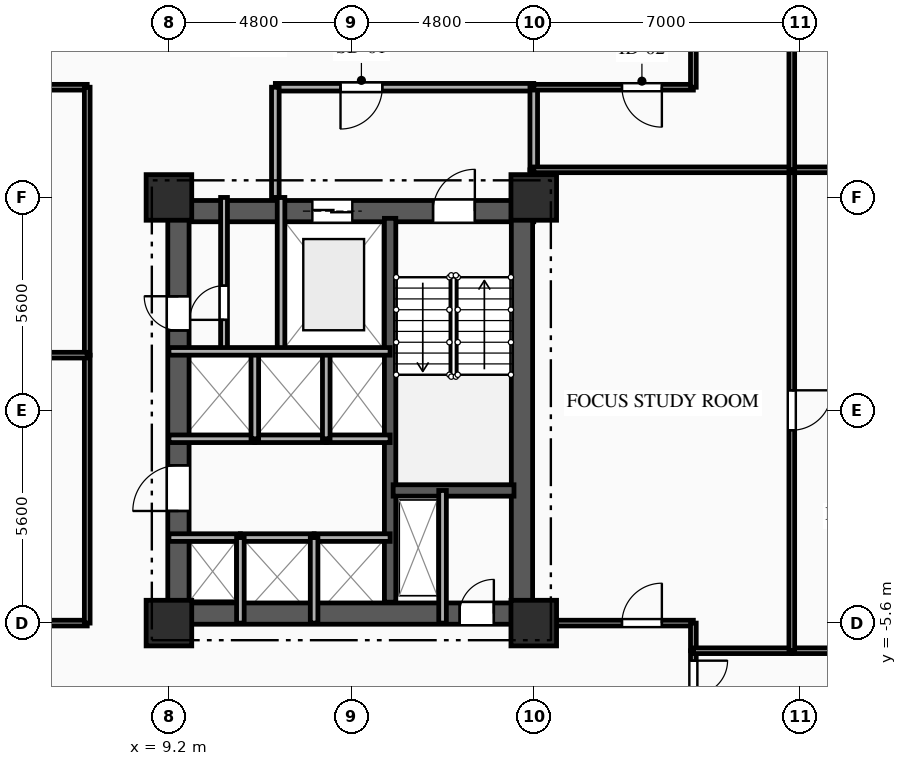
"""IFC4 building model, lengths in metres.
Left out: names, types, materials, properties, quantities, classifications, styles, units other than length and angle.
Written with IfcOpenShell. Run it as: python <this file> out.ifc"""

import sys

from ifc_helpers import new_model, si_unit, direction, frame, frame_2d, origin, origin_2d, place, context, subcontext, project, spatial, rectangle, extrude, element, fill, save


model = new_model("IFC4")
c1 = context("Model", 3, precision=1e-05, world=origin(), true_north=direction((0.0, 1.0)))
c2 = subcontext(c1, "Body", "Model", "MODEL_VIEW")
j1 = project(units=[si_unit("LENGTHUNIT", "METRE"), si_unit("PLANEANGLEUNIT", "RADIAN")], contexts=[c1])
p1 = place(None, origin())
s1 = spatial("IfcSite", under=j1, at=p1, CompositionType="ELEMENT")
p2 = place(p1, origin())
s2 = spatial("IfcBuilding", under=s1, at=p2, CompositionType="ELEMENT")
p3 = place(p2, frame((0.0, 0.0, 37.05)))
s3 = spatial("IfcBuildingStorey", under=s2, at=p3, CompositionType="ELEMENT", Elevation=37.05)
for number, where, z_axis, x_axis in (
    (1, (9.2, -5.6, 0.0), (0.0, 0.0, 1.0), (1.0, 0.0, 0.0)),
    (2, (9.2, 5.6, 0.0), (0.0, 0.0, 1.0), (1.0, 0.0, 0.0)),
    (3, (18.8, -5.6, 0.0), (0.0, 0.0, 1.0), (1.0, 0.0, 0.0)),
    (4, (18.8, 5.6, 0.0), (0.0, 0.0, 1.0), (1.0, 0.0, 0.0)),
):
    element("IfcColumn", number, at=place(p3, frame(where, z_axis=z_axis, x_axis=x_axis)), inside=s3, PredefinedType="COLUMN", context=c2, shape_type="SweptSolid", body=[
        extrude(rectangle(XDim=1.2, YDim=1.2, at=origin_2d()), origin(), (0.0, 0.0, 1.0), 3.35),
    ])
p4 = place(p3, frame((9.2, 5.24, 0.0), z_axis=(0.0, 0.0, 1.0), x_axis=(1.0, 0.0, 0.0)))
e5 = element("IfcWall", 5, at=p4, inside=s3, PredefinedType="SHEAR", context=c2, shape_type="SweptSolid", body=[
    extrude(rectangle(XDim=9.6, YDim=0.56, at=frame_2d((4.8, 0.0))), origin(), (0.0, 0.0, 1.0), 3.035),
])
p5 = place(p4, frame((6.95, 0.0, 0.0)))
e6 = element("IfcOpeningElement", 6, at=p5, cuts=e5, PredefinedType="OPENING", context=c2, shape_type="SweptSolid", body=[
    extrude(rectangle(XDim=1.1, YDim=2.15, at=frame_2d((0.55, 1.075))), frame((0.0, 0.29, 0.0), z_axis=(0.0, -1.0, 0.0), x_axis=(1.0, 0.0, 0.0)), (0.0, 0.0, 1.0), 0.58),
])
p6 = place(p4, frame((3.775, 0.0, 0.0)))
e7 = element("IfcOpeningElement", 7, at=p6, cuts=e5, PredefinedType="OPENING", context=c2, shape_type="SweptSolid", body=[
    extrude(rectangle(XDim=1.05, YDim=2.1, at=frame_2d((0.525, 1.05))), frame((0.0, 0.29, 0.0), z_axis=(0.0, -1.0, 0.0), x_axis=(1.0, 0.0, 0.0)), (0.0, 0.0, 1.0), 0.58),
])
p7 = place(p3, frame((9.2, -5.35, 0.0), z_axis=(0.0, 0.0, 1.0), x_axis=(1.0, 0.0, 0.0)))
e8 = element("IfcWall", 8, at=p7, inside=s3, PredefinedType="SHEAR", context=c2, shape_type="SweptSolid", body=[
    extrude(rectangle(XDim=9.6, YDim=0.56, at=frame_2d((4.8, 0.0))), origin(), (0.0, 0.0, 1.0), 3.035),
])
p8 = place(p7, frame((7.65, 0.0, 0.0)))
e9 = element("IfcOpeningElement", 9, at=p8, cuts=e8, PredefinedType="OPENING", context=c2, shape_type="SweptSolid", body=[
    extrude(rectangle(XDim=0.9, YDim=2.1, at=frame_2d((0.45, 1.05))), frame((0.0, 0.29, 0.0), z_axis=(0.0, -1.0, 0.0), x_axis=(1.0, 0.0, 0.0)), (0.0, 0.0, 1.0), 0.58),
])
p9 = place(p3, frame((9.45, -5.05, 0.0), z_axis=(0.0, 0.0, 1.0), x_axis=(0.0, 1.0, 0.0)))
e10 = element("IfcWall", 10, at=p9, inside=s3, PredefinedType="SHEAR", context=c2, shape_type="SweptSolid", body=[
    extrude(rectangle(XDim=10.1, YDim=0.56, at=frame_2d((5.05, 0.0))), origin(), (0.0, 0.0, 1.0), 3.035),
])
p10 = place(p9, frame((7.15, 0.0, 0.0)))
e11 = element("IfcOpeningElement", 11, at=p10, cuts=e10, PredefinedType="OPENING", context=c2, shape_type="SweptSolid", body=[
    extrude(rectangle(XDim=0.9, YDim=2.1, at=frame_2d((0.45, 1.05))), frame((0.0, 0.29, 0.0), z_axis=(0.0, -1.0, 0.0), x_axis=(1.0, 0.0, 0.0)), (0.0, 0.0, 1.0), 0.58),
])
p11 = place(p9, frame((2.4, 0.0, 0.0)))
e12 = element("IfcOpeningElement", 12, at=p11, cuts=e10, PredefinedType="OPENING", context=c2, shape_type="SweptSolid", body=[
    extrude(rectangle(XDim=1.2, YDim=2.15, at=frame_2d((0.6, 1.075))), frame((0.0, 0.29, 0.0), z_axis=(0.0, -1.0, 0.0), x_axis=(1.0, 0.0, 0.0)), (0.0, 0.0, 1.0), 0.58),
])
p12 = place(p3, frame((18.49, -5.05, 0.0), z_axis=(0.0, 0.0, 1.0), x_axis=(0.0, 1.0, 0.0)))
e13 = element("IfcWall", 13, at=p12, inside=s3, PredefinedType="SHEAR", context=c2, shape_type="SweptSolid", body=[
    extrude(rectangle(XDim=10.1, YDim=0.56, at=frame_2d((5.05, 0.0))), origin(), (0.0, 0.0, 1.0), 3.035),
])
p13 = place(p3, frame((15.02, -5.05, 0.0), z_axis=(0.0, 0.0, 1.0), x_axis=(0.0, 1.0, 0.0)))
e14 = element("IfcWall", 14, at=p13, inside=s3, PredefinedType="SHEAR", context=c2, shape_type="SweptSolid", body=[
    extrude(rectangle(XDim=10.1, YDim=0.3, at=frame_2d((5.05, 0.0))), origin(), (0.0, 0.0, 1.0), 3.035),
])
p14 = place(p3, frame((15.1, -2.11, 0.0), z_axis=(0.0, 0.0, 1.0), x_axis=(1.0, 0.0, 0.0)))
e15 = element("IfcWall", 15, at=p14, inside=s3, PredefinedType="SHEAR", context=c2, shape_type="SweptSolid", body=[
    extrude(rectangle(XDim=3.18, YDim=0.3, at=frame_2d((1.59, 0.0))), origin(), (0.0, 0.0, 1.0), 3.035),
])
p15 = place(p3, frame((16.4, -2.11, 0.0), z_axis=(0.0, 0.0, 1.0), x_axis=(0.0, -1.0, 0.0)))
e16 = element("IfcWall", 16, at=p15, inside=s3, PredefinedType="PARTITIONING", context=c2, shape_type="SweptSolid", body=[
    extrude(rectangle(XDim=3.49, YDim=0.2, at=frame_2d((1.745, 0.0))), origin(), (0.0, 0.0, 1.0), 3.035),
])
p16 = place(p3, frame((12.15, 5.6, 0.0), z_axis=(0.0, 0.0, 1.0), x_axis=(0.0, -1.0, 0.0)))
e17 = element("IfcWall", 17, at=p16, inside=s3, PredefinedType="PARTITIONING", context=c2, shape_type="SweptSolid", body=[
    extrude(rectangle(XDim=4.05, YDim=0.2, at=frame_2d((2.025, 0.0))), origin(), (0.0, 0.0, 1.0), 3.035),
])
p17 = place(p3, frame((18.8, 8.5, 0.0), z_axis=(0.0, 0.0, 1.0), x_axis=(-1.0, 0.0, 0.0)))
e18 = element("IfcWall", 18, at=p17, inside=s3, PredefinedType="PARTITIONING", context=c2, shape_type="SweptSolid", body=[
    extrude(rectangle(XDim=6.8, YDim=0.2, at=frame_2d((3.4, 0.0))), origin(), (0.0, 0.0, 1.0), 3.035),
])
p18 = place(p17, frame((3.985, 0.0, 0.0)))
e19 = element("IfcOpeningElement", 19, at=p18, cuts=e18, PredefinedType="OPENING", context=c2, shape_type="SweptSolid", body=[
    extrude(rectangle(XDim=1.1, YDim=2.15, at=frame_2d((0.55, 1.075))), frame((0.0, 0.11, 0.0), z_axis=(0.0, -1.0, 0.0), x_axis=(1.0, 0.0, 0.0)), (0.0, 0.0, 1.0), 0.22),
])
p19 = place(p3, frame((12.0, 8.5, 0.0), z_axis=(0.0, 0.0, 1.0), x_axis=(0.0, -1.0, 0.0)))
e20 = element("IfcWall", 20, at=p19, inside=s3, PredefinedType="PARTITIONING", context=c2, shape_type="SweptSolid", body=[
    extrude(rectangle(XDim=2.9, YDim=0.2, at=frame_2d((1.45, 0.0))), origin(), (0.0, 0.0, 1.0), 3.035),
])
p20 = place(p3, frame((18.8, 5.6, 0.0), z_axis=(0.0, 0.0, 1.0), x_axis=(0.0, 1.0, 0.0)))
e21 = element("IfcWall", 21, at=p20, inside=s3, PredefinedType="PARTITIONING", context=c2, shape_type="SweptSolid", body=[
    extrude(rectangle(XDim=0.727, YDim=0.2, at=frame_2d((0.363, 0.0))), origin(), (0.0, 0.0, 1.0), 2.52),
])
p21 = place(p3, frame((18.8, 6.327, 0.0), z_axis=(0.0, 0.0, 1.0), x_axis=(0.0, 1.0, 0.0)))
e22 = element("IfcWall", 22, at=p21, inside=s3, PredefinedType="PARTITIONING", context=c2, shape_type="SweptSolid", body=[
    extrude(rectangle(XDim=2.173, YDim=0.2, at=frame_2d((1.086, 0.0))), origin(), (0.0, 0.0, 1.0), 2.52),
])
p22 = place(p3, frame((10.65, 1.55, 0.0), z_axis=(0.0, 0.0, 1.0), x_axis=(0.0, 1.0, 0.0)))
e23 = element("IfcWall", 23, at=p22, inside=s3, PredefinedType="PARTITIONING", context=c2, shape_type="SweptSolid", body=[
    extrude(rectangle(XDim=4.05, YDim=0.18, at=frame_2d((2.025, 0.0))), origin(), (0.0, 0.0, 1.0), 3.035),
])
p23 = place(p22, frame((0.829, 0.0, 0.0)))
e24 = element("IfcOpeningElement", 24, at=p23, cuts=e23, PredefinedType="OPENING", context=c2, shape_type="SweptSolid", body=[
    extrude(rectangle(XDim=0.9, YDim=2.1, at=frame_2d((0.45, 1.05))), frame((0.0, 0.1, 0.0), z_axis=(0.0, -1.0, 0.0), x_axis=(1.0, 0.0, 0.0)), (0.0, 0.0, 1.0), 0.2),
])
p24 = place(p3, frame((9.2, -3.35, 0.0), z_axis=(0.0, 0.0, 1.0), x_axis=(1.0, 0.0, 0.0)))
e25 = element("IfcWall", 25, at=p24, inside=s3, PredefinedType="PARTITIONING", context=c2, shape_type="SweptSolid", body=[
    extrude(rectangle(XDim=1.88, YDim=0.2, at=frame_2d((0.94, 0.0))), origin(), (0.0, 0.0, 1.0), 2.75),
])
p25 = place(p3, frame((11.08, -3.35, 0.0), z_axis=(0.0, 0.0, 1.0), x_axis=(1.0, 0.0, 0.0)))
e26 = element("IfcWall", 26, at=p25, inside=s3, PredefinedType="PARTITIONING", context=c2, shape_type="SweptSolid", body=[
    extrude(rectangle(XDim=1.94, YDim=0.2, at=frame_2d((0.97, 0.0))), origin(), (0.0, 0.0, 1.0), 3.035),
])
p26 = place(p3, frame((13.02, -3.35, 0.0), z_axis=(0.0, 0.0, 1.0), x_axis=(1.0, 0.0, 0.0)))
e27 = element("IfcWall", 27, at=p26, inside=s3, PredefinedType="PARTITIONING", context=c2, shape_type="SweptSolid", body=[
    extrude(rectangle(XDim=2.0, YDim=0.2, at=frame_2d((1.0, 0.0))), origin(), (0.0, 0.0, 1.0), 3.035),
])
p27 = place(p3, frame((11.46, -0.75, 0.0), z_axis=(0.0, 0.0, 1.0), x_axis=(-1.0, 0.0, 0.0)))
e28 = element("IfcWall", 28, at=p27, inside=s3, PredefinedType="PARTITIONING", context=c2, shape_type="SweptSolid", body=[
    extrude(rectangle(XDim=2.26, YDim=0.2, at=frame_2d((1.13, 0.0))), origin(), (0.0, 0.0, 1.0), 3.035),
])
p28 = place(p3, frame((13.34, -0.75, 0.0), z_axis=(0.0, 0.0, 1.0), x_axis=(-1.0, 0.0, 0.0)))
e29 = element("IfcWall", 29, at=p28, inside=s3, PredefinedType="PARTITIONING", context=c2, shape_type="SweptSolid", body=[
    extrude(rectangle(XDim=1.88, YDim=0.2, at=frame_2d((0.94, 0.0))), origin(), (0.0, 0.0, 1.0), 3.035),
])
p29 = place(p3, frame((15.02, -0.75, 0.0), z_axis=(0.0, 0.0, 1.0), x_axis=(-1.0, 0.0, 0.0)))
e30 = element("IfcWall", 30, at=p29, inside=s3, PredefinedType="PARTITIONING", context=c2, shape_type="SweptSolid", body=[
    extrude(rectangle(XDim=1.68, YDim=0.2, at=frame_2d((0.84, 0.0))), origin(), (0.0, 0.0, 1.0), 3.035),
])
for number, where, z_axis, x_axis in (
    (31, (11.08, -5.6, 0.0), (0.0, 0.0, 1.0), (0.0, 1.0, 0.0)),
    (32, (13.02, -5.6, 0.0), (0.0, 0.0, 1.0), (0.0, 1.0, 0.0)),
):
    element("IfcWall", number, at=place(p3, frame(where, z_axis=z_axis, x_axis=x_axis)), inside=s3, PredefinedType="PARTITIONING", context=c2, shape_type="SweptSolid", body=[
        extrude(rectangle(XDim=2.25, YDim=0.2, at=frame_2d((1.125, 0.0))), origin(), (0.0, 0.0, 1.0), 3.035),
    ])
for number, where, z_axis, x_axis in (
    (33, (11.46, -0.75, 0.0), (0.0, 0.0, 1.0), (0.0, 1.0, 0.0)),
    (34, (13.34, -0.75, 0.0), (0.0, 0.0, 1.0), (0.0, 1.0, 0.0)),
):
    element("IfcWall", number, at=place(p3, frame(where, z_axis=z_axis, x_axis=x_axis)), inside=s3, PredefinedType="PARTITIONING", context=c2, shape_type="SweptSolid", body=[
        extrude(rectangle(XDim=2.3, YDim=0.2, at=frame_2d((1.15, 0.0))), origin(), (0.0, 0.0, 1.0), 3.035),
    ])
p30 = place(p3, frame((23.0, 8.5, 0.0), z_axis=(0.0, 0.0, 1.0), x_axis=(-1.0, 0.0, 0.0)))
e35 = element("IfcWall", 35, at=p30, inside=s3, PredefinedType="PARTITIONING", context=c2, shape_type="SweptSolid", body=[
    extrude(rectangle(XDim=4.2, YDim=0.15, at=frame_2d((2.1, 0.0))), origin(), (0.0, 0.0, 1.0), 3.035),
])
p31 = place(p30, frame((0.829, 0.0, 0.0)))
e36 = element("IfcOpeningElement", 36, at=p31, cuts=e35, PredefinedType="OPENING", context=c2, shape_type="SweptSolid", body=[
    extrude(rectangle(XDim=1.05, YDim=2.15, at=frame_2d((0.525, 1.075))), frame((0.0, 0.085, 0.0), z_axis=(0.0, -1.0, 0.0), x_axis=(1.0, 0.0, 0.0)), (0.0, 0.0, 1.0), 0.17),
])
p32 = place(p3, frame((23.0, 10.65, 0.0), z_axis=(0.0, 0.0, 1.0), x_axis=(0.0, -1.0, 0.0)))
e37 = element("IfcWall", 37, at=p32, inside=s3, PredefinedType="PARTITIONING", context=c2, shape_type="SweptSolid", body=[
    extrude(rectangle(XDim=2.15, YDim=0.15, at=frame_2d((1.075, 0.0))), origin(), (0.0, 0.0, 1.0), 3.035),
])
p33 = place(p3, frame((7.05, 8.5, 0.0), z_axis=(0.0, 0.0, 1.0), x_axis=(-1.0, 0.0, 0.0)))
e38 = element("IfcWall", 38, at=p33, inside=s3, PredefinedType="PARTITIONING", context=c2, shape_type="SweptSolid", body=[
    extrude(rectangle(XDim=7.05, YDim=0.15, at=frame_2d((3.525, 0.0))), origin(), (0.0, 0.0, 1.0), 3.035),
])
p34 = place(p3, frame((23.0, -6.327, 0.0), z_axis=(0.0, 0.0, 1.0), x_axis=(0.0, -1.0, 0.0)))
e39 = element("IfcWall", 39, at=p34, inside=s3, PredefinedType="PARTITIONING", context=c2, shape_type="SweptSolid", body=[
    extrude(rectangle(XDim=1.423, YDim=0.15, at=frame_2d((0.711, 0.0))), origin(), (0.0, 0.0, 1.0), 3.035),
])
p35 = place(p34, frame((0.261, 0.0, 0.0)))
e40 = element("IfcOpeningElement", 40, at=p35, cuts=e39, PredefinedType="OPENING", context=c2, shape_type="SweptSolid", body=[
    extrude(rectangle(XDim=0.9, YDim=2.1, at=frame_2d((0.45, 1.05))), frame((0.0, 0.085, 0.0), z_axis=(0.0, -1.0, 0.0), x_axis=(1.0, 0.0, 0.0)), (0.0, 0.0, 1.0), 0.17),
])
p36 = place(p3, frame((18.8, -5.6, 0.0), z_axis=(0.0, 0.0, 1.0), x_axis=(1.0, 0.0, 0.0)))
e41 = element("IfcWall", 41, at=p36, inside=s3, PredefinedType="PARTITIONING", context=c2, shape_type="SweptSolid", body=[
    extrude(rectangle(XDim=4.2, YDim=0.15, at=frame_2d((2.1, 0.0))), origin(), (0.0, 0.0, 1.0), 3.035),
])
p37 = place(p36, frame((2.321, 0.0, 0.0)))
e42 = element("IfcOpeningElement", 42, at=p37, cuts=e41, PredefinedType="OPENING", context=c2, shape_type="SweptSolid", body=[
    extrude(rectangle(XDim=1.05, YDim=2.15, at=frame_2d((0.525, 1.075))), frame((0.0, 0.085, 0.0), z_axis=(0.0, -1.0, 0.0), x_axis=(1.0, 0.0, 0.0)), (0.0, 0.0, 1.0), 0.17),
])
p38 = place(p3, frame((23.0, -5.6, 0.0), z_axis=(0.0, 0.0, 1.0), x_axis=(0.0, -1.0, 0.0)))
e43 = element("IfcWall", 43, at=p38, inside=s3, PredefinedType="PARTITIONING", context=c2, shape_type="SweptSolid", body=[
    extrude(rectangle(XDim=0.727, YDim=0.15, at=frame_2d((0.363, 0.0))), origin(), (0.0, 0.0, 1.0), 3.035),
])
p39 = place(p3, frame((0.0, -5.6, 0.0), z_axis=(0.0, 0.0, 1.0), x_axis=(1.0, 0.0, 0.0)))
e44 = element("IfcWall", 44, at=p39, inside=s3, PredefinedType="PARTITIONING", context=c2, shape_type="SweptSolid", body=[
    extrude(rectangle(XDim=7.05, YDim=0.15, at=frame_2d((3.525, 0.0))), origin(), (0.0, 0.0, 1.0), 2.52),
])
for number, where, z_axis, x_axis in (
    (45, (7.05, -5.6, 0.0), (0.0, 0.0, 1.0), (0.0, 1.0, 0.0)),
    (46, (7.05, 1.45, 0.0), (0.0, 0.0, 1.0), (0.0, 1.0, 0.0)),
):
    element("IfcWall", number, at=place(p3, frame(where, z_axis=z_axis, x_axis=x_axis)), inside=s3, PredefinedType="PARTITIONING", context=c2, shape_type="SweptSolid", body=[
        extrude(rectangle(XDim=7.05, YDim=0.15, at=frame_2d((3.525, 0.0))), origin(), (0.0, 0.0, 1.0), 3.035),
    ])
p40 = place(p3, frame((23.0, -6.327, 0.0), z_axis=(0.0, 0.0, 1.0), x_axis=(1.0, 0.0, 0.0)))
e47 = element("IfcWall", 47, at=p40, inside=s3, PredefinedType="PARTITIONING", context=c2, shape_type="SweptSolid", body=[
    extrude(rectangle(XDim=2.59, YDim=0.15, at=frame_2d((1.295, 0.0))), origin(), (0.0, 0.0, 1.0), 3.035),
])
p41 = place(p3, frame((25.59, -6.327, 0.0), z_axis=(0.0, 0.0, 1.0), x_axis=(1.0, 0.0, 0.0)))
e48 = element("IfcWall", 48, at=p41, inside=s3, PredefinedType="PARTITIONING", context=c2, shape_type="SweptSolid", body=[
    extrude(rectangle(XDim=2.1, YDim=0.15, at=frame_2d((1.05, 0.0))), origin(), (0.0, 0.0, 1.0), 3.035),
])
p42 = place(p3, frame((25.59, 6.327, 0.0), z_axis=(0.0, 0.0, 1.0), x_axis=(0.0, -1.0, 0.0)))
e49 = element("IfcWall", 49, at=p42, inside=s3, PredefinedType="PARTITIONING", context=c2, shape_type="SweptSolid", body=[
    extrude(rectangle(XDim=12.654, YDim=0.15, at=frame_2d((6.327, 0.0))), origin(), (0.0, 0.0, 1.0), 2.69),
])
p43 = place(p42, frame((5.802, 0.0, 0.0)))
e50 = element("IfcOpeningElement", 50, at=p43, cuts=e49, PredefinedType="OPENING", context=c2, shape_type="SweptSolid", body=[
    extrude(rectangle(XDim=1.05, YDim=2.15, at=frame_2d((0.525, 1.075))), frame((0.0, 0.085, 0.0), z_axis=(0.0, -1.0, 0.0), x_axis=(1.0, 0.0, 0.0)), (0.0, 0.0, 1.0), 0.17),
])
p44 = place(p3, frame((18.8, 6.327, 0.0), z_axis=(0.0, 0.0, 1.0), x_axis=(1.0, 0.0, 0.0)))
e51 = element("IfcWall", 51, at=p44, inside=s3, PredefinedType="PARTITIONING", context=c2, shape_type="SweptSolid", body=[
    extrude(rectangle(XDim=6.79, YDim=0.15, at=frame_2d((3.395, 0.0))), origin(), (0.0, 0.0, 1.0), 3.035),
])
p45 = place(p3, frame((25.59, 6.327, 0.0), z_axis=(0.0, 0.0, 1.0), x_axis=(1.0, 0.0, 0.0)))
e52 = element("IfcWall", 52, at=p45, inside=s3, PredefinedType="PARTITIONING", context=c2, shape_type="SweptSolid", body=[
    extrude(rectangle(XDim=7.21, YDim=0.15, at=frame_2d((3.605, 0.0))), origin(), (0.0, 0.0, 1.0), 3.035),
])
p46 = place(p3, frame((25.59, 19.4, 0.0), z_axis=(0.0, 0.0, 1.0), x_axis=(0.0, -1.0, 0.0)))
e53 = element("IfcWall", 53, at=p46, inside=s3, PredefinedType="PARTITIONING", context=c2, shape_type="SweptSolid", body=[
    extrude(rectangle(XDim=13.073, YDim=0.15, at=frame_2d((6.537, 0.0))), origin(), (0.0, 0.0, 1.0), 2.69),
])
p47 = place(p46, frame((8.727, 0.0, 0.0)))
e54 = element("IfcOpeningElement", 54, at=p47, cuts=e53, PredefinedType="OPENING", context=c2, shape_type="SweptSolid", body=[
    extrude(rectangle(XDim=1.05, YDim=2.15, at=frame_2d((0.525, 1.075))), frame((0.0, 0.085, 0.0), z_axis=(0.0, -1.0, 0.0), x_axis=(1.0, 0.0, 0.0)), (0.0, 0.0, 1.0), 0.17),
])
p48 = place(p3, frame((-7.05, 1.45, 0.0), z_axis=(0.0, 0.0, 1.0), x_axis=(1.0, 0.0, 0.0)))
e55 = element("IfcWall", 55, at=p48, inside=s3, PredefinedType="PARTITIONING", context=c2, shape_type="SweptSolid", body=[
    extrude(rectangle(XDim=14.1, YDim=0.15, at=frame_2d((7.05, 0.0))), origin(), (0.0, 0.0, 1.0), 3.035),
])
p49 = place(p3, frame((9.2, 1.55, 0.0), z_axis=(0.0, 0.0, 1.0), x_axis=(1.0, 0.0, 0.0)))
e56 = element("IfcWall", 56, at=p49, inside=s3, PredefinedType="PARTITIONING", context=c2, shape_type="SweptSolid", body=[
    extrude(rectangle(XDim=5.82, YDim=0.2, at=frame_2d((2.91, 0.0))), origin(), (0.0, 0.0, 1.0), 3.035),
])
p50 = place(p5, origin())
e57 = element("IfcDoor", 57, at=p50, inside=s3, OperationType="SINGLE_SWING_RIGHT", PredefinedType="DOOR", context=c2, shape_type="SweptSolid", body=[
    extrude(rectangle(XDim=1.1, YDim=2.15, at=frame_2d((0.55, 1.075))), frame((0.0, 0.025, 0.0), z_axis=(0.0, -1.0, 0.0), x_axis=(1.0, 0.0, 0.0)), (0.0, 0.0, 1.0), 0.05),
])
fill(e6, e57)
p51 = place(p6, origin())
e58 = element("IfcDoor", 58, at=p51, inside=s3, OperationType="DOUBLE_DOOR_SLIDING", PredefinedType="DOOR", context=c2, shape_type="SweptSolid", body=[
    extrude(rectangle(XDim=1.05, YDim=2.1, at=frame_2d((0.525, 1.05))), frame((0.0, 0.025, 0.0), z_axis=(0.0, -1.0, 0.0), x_axis=(1.0, 0.0, 0.0)), (0.0, 0.0, 1.0), 0.05),
])
fill(e7, e58)
p52 = place(p8, origin())
e59 = element("IfcDoor", 59, at=p52, inside=s3, OperationType="SINGLE_SWING_RIGHT", PredefinedType="DOOR", context=c2, shape_type="SweptSolid", body=[
    extrude(rectangle(XDim=0.9, YDim=2.1, at=frame_2d((0.45, 1.05))), frame((0.0, 0.025, 0.0), z_axis=(0.0, -1.0, 0.0), x_axis=(1.0, 0.0, 0.0)), (0.0, 0.0, 1.0), 0.05),
])
fill(e9, e59)
p53 = place(p18, origin())
e60 = element("IfcDoor", 60, at=p53, inside=s3, OperationType="SINGLE_SWING_RIGHT", PredefinedType="DOOR", context=c2, shape_type="SweptSolid", body=[
    extrude(rectangle(XDim=1.1, YDim=2.15, at=frame_2d((0.55, 1.075))), frame((0.0, 0.025, 0.0), z_axis=(0.0, -1.0, 0.0), x_axis=(1.0, 0.0, 0.0)), (0.0, 0.0, 1.0), 0.05),
])
fill(e19, e60)
p54 = place(p23, origin())
e61 = element("IfcDoor", 61, at=p54, inside=s3, OperationType="SINGLE_SWING_LEFT", PredefinedType="DOOR", context=c2, shape_type="SweptSolid", body=[
    extrude(rectangle(XDim=0.9, YDim=2.1, at=frame_2d((0.45, 1.05))), frame((0.0, 0.025, 0.0), z_axis=(0.0, -1.0, 0.0), x_axis=(1.0, 0.0, 0.0)), (0.0, 0.0, 1.0), 0.05),
])
fill(e24, e61)
p55 = place(p10, origin())
e62 = element("IfcDoor", 62, at=p55, inside=s3, OperationType="SINGLE_SWING_RIGHT", PredefinedType="DOOR", context=c2, shape_type="SweptSolid", body=[
    extrude(rectangle(XDim=0.9, YDim=2.1, at=frame_2d((0.45, 1.05))), frame((0.0, 0.025, 0.0), z_axis=(0.0, -1.0, 0.0), x_axis=(1.0, 0.0, 0.0)), (0.0, 0.0, 1.0), 0.05),
])
fill(e11, e62)
p56 = place(p11, origin())
e63 = element("IfcDoor", 63, at=p56, inside=s3, OperationType="SINGLE_SWING_LEFT", PredefinedType="DOOR", context=c2, shape_type="SweptSolid", body=[
    extrude(rectangle(XDim=1.2, YDim=2.15, at=frame_2d((0.6, 1.075))), frame((0.0, 0.025, 0.0), z_axis=(0.0, -1.0, 0.0), x_axis=(1.0, 0.0, 0.0)), (0.0, 0.0, 1.0), 0.05),
])
fill(e12, e63)
p57 = place(p31, origin())
e64 = element("IfcDoor", 64, at=p57, inside=s3, OperationType="SINGLE_SWING_LEFT", PredefinedType="DOOR", context=c2, shape_type="SweptSolid", body=[
    extrude(rectangle(XDim=1.05, YDim=2.15, at=frame_2d((0.525, 1.075))), frame((0.0, 0.025, 0.0), z_axis=(0.0, -1.0, 0.0), x_axis=(1.0, 0.0, 0.0)), (0.0, 0.0, 1.0), 0.05),
])
fill(e36, e64)
p58 = place(p35, origin())
e65 = element("IfcDoor", 65, at=p58, inside=s3, OperationType="SINGLE_SWING_LEFT", PredefinedType="DOOR", context=c2, shape_type="SweptSolid", body=[
    extrude(rectangle(XDim=0.9, YDim=2.1, at=frame_2d((0.45, 1.05))), frame((0.0, 0.025, 0.0), z_axis=(0.0, -1.0, 0.0), x_axis=(1.0, 0.0, 0.0)), (0.0, 0.0, 1.0), 0.05),
])
fill(e40, e65)
p59 = place(p37, origin())
e66 = element("IfcDoor", 66, at=p59, inside=s3, OperationType="SINGLE_SWING_RIGHT", PredefinedType="DOOR", context=c2, shape_type="SweptSolid", body=[
    extrude(rectangle(XDim=1.05, YDim=2.15, at=frame_2d((0.525, 1.075))), frame((0.0, 0.025, 0.0), z_axis=(0.0, -1.0, 0.0), x_axis=(1.0, 0.0, 0.0)), (0.0, 0.0, 1.0), 0.05),
])
fill(e42, e66)
p60 = place(p43, origin())
e67 = element("IfcDoor", 67, at=p60, inside=s3, OperationType="SINGLE_SWING_LEFT", PredefinedType="DOOR", context=c2, shape_type="SweptSolid", body=[
    extrude(rectangle(XDim=1.05, YDim=2.15, at=frame_2d((0.525, 1.075))), frame((0.0, 0.025, 0.0), z_axis=(0.0, -1.0, 0.0), x_axis=(1.0, 0.0, 0.0)), (0.0, 0.0, 1.0), 0.05),
])
fill(e50, e67)
save(model, sys.argv[1])
